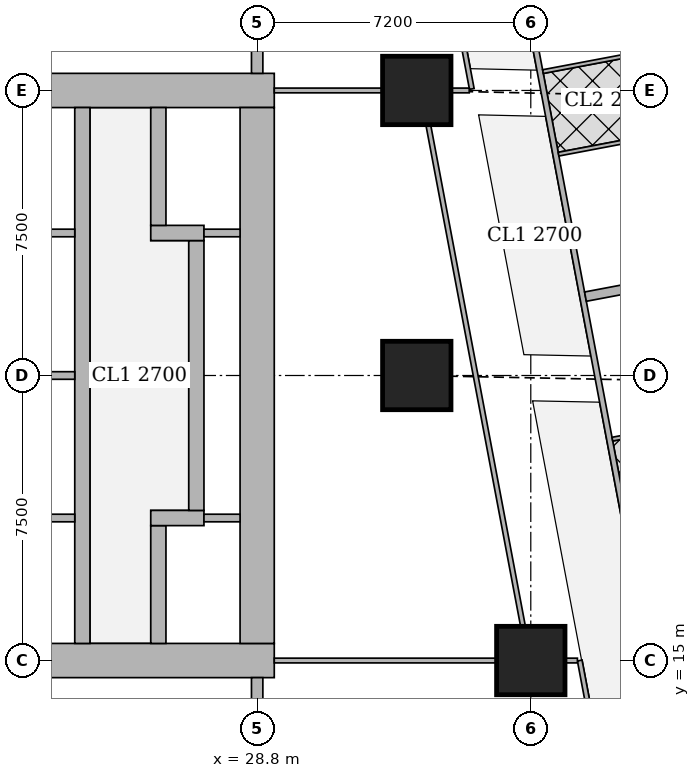
"""IFC4 building model, lengths in metres.
Left out: names, types, materials, properties, quantities, classifications, styles, units other than length and angle.
Written with IfcOpenShell. Run it as: python <this file> out.ifc"""

import sys

from ifc_helpers import new_model, si_unit, direction, frame, frame_2d, origin, origin_2d, place, context, subcontext, project, spatial, rectangle, extrude, element, fill, save


model = new_model("IFC4")
c1 = context("Model", 3, precision=1e-05, world=origin(), true_north=direction((0.0, 1.0)))
c2 = subcontext(c1, "Body", "Model", "MODEL_VIEW")
j1 = project(units=[si_unit("LENGTHUNIT", "METRE"), si_unit("PLANEANGLEUNIT", "RADIAN")], contexts=[c1])
p1 = place(None, origin())
s1 = spatial("IfcSite", under=j1, at=p1, CompositionType="ELEMENT")
p2 = place(p1, origin())
s2 = spatial("IfcBuilding", under=s1, at=p2, CompositionType="ELEMENT")
p3 = place(p2, frame((0.0, 0.0, 53.75)))
s3 = spatial("IfcBuildingStorey", under=s2, at=p3, CompositionType="ELEMENT", Elevation=53.75)
for number, where, z_axis, x_axis in (
    (1, (36.0, 15.0, 0.0), (0.0, 0.0, 1.0), (1.0, 0.0, 0.0)),
    (2, (33.0, 22.5, 0.0), (0.0, 0.0, 1.0), (1.0, 0.0, 0.0)),
    (3, (33.0, 30.0, 0.0), (0.0, 0.0, 1.0), (1.0, 0.0, 0.0)),
):
    element("IfcColumn", number, at=place(p3, frame(where, z_axis=z_axis, x_axis=x_axis)), inside=s3, PredefinedType="COLUMN", context=c2, shape_type="SweptSolid", body=[
        extrude(rectangle(XDim=1.8, YDim=1.8, at=origin_2d()), origin(), (0.0, 0.0, 1.0), 3.75),
    ])
p4 = place(p3, frame((13.95, 15.0, 0.0), z_axis=(0.0, 0.0, 1.0), x_axis=(1.0, 0.0, 0.0)))
e4 = element("IfcWall", 4, at=p4, inside=s3, PredefinedType="SHEAR", context=c2, shape_type="SweptSolid", body=[
    extrude(rectangle(XDim=15.3, YDim=0.9, at=frame_2d((7.65, 0.0))), origin(), (0.0, 0.0, 1.0), 3.75),
])
p5 = place(p4, frame((4.45, 0.0, 0.0)))
e5 = element("IfcOpeningElement", 5, at=p5, cuts=e4, PredefinedType="OPENING", context=c2, shape_type="SweptSolid", body=[
    extrude(rectangle(XDim=1.8, YDim=2.1, at=frame_2d((0.9, 1.05))), frame((0.0, 0.46, 0.0), z_axis=(0.0, -1.0, 0.0), x_axis=(1.0, 0.0, 0.0)), (0.0, 0.0, 1.0), 0.92),
])
p6 = place(p4, frame((10.7, 0.0, 0.0)))
e6 = element("IfcOpeningElement", 6, at=p6, cuts=e4, PredefinedType="OPENING", context=c2, shape_type="SweptSolid", body=[
    extrude(rectangle(XDim=1.1, YDim=2.1, at=frame_2d((0.55, 1.05))), frame((0.0, 0.46, 0.0), z_axis=(0.0, -1.0, 0.0), x_axis=(1.0, 0.0, 0.0)), (0.0, 0.0, 1.0), 0.92),
])
p7 = place(p3, frame((13.95, 30.0, 0.0), z_axis=(0.0, 0.0, 1.0), x_axis=(1.0, 0.0, 0.0)))
e7 = element("IfcWall", 7, at=p7, inside=s3, PredefinedType="SHEAR", context=c2, shape_type="SweptSolid", body=[
    extrude(rectangle(XDim=15.3, YDim=0.9, at=frame_2d((7.65, 0.0))), origin(), (0.0, 0.0, 1.0), 3.75),
])
p8 = place(p7, frame((4.45, 0.0, 0.0)))
e8 = element("IfcOpeningElement", 8, at=p8, cuts=e7, PredefinedType="OPENING", context=c2, shape_type="SweptSolid", body=[
    extrude(rectangle(XDim=1.8, YDim=2.1, at=frame_2d((0.9, 1.05))), frame((0.0, 0.46, 0.0), z_axis=(0.0, -1.0, 0.0), x_axis=(1.0, 0.0, 0.0)), (0.0, 0.0, 1.0), 0.92),
])
p9 = place(p7, frame((10.7, 0.0, 0.0)))
e9 = element("IfcOpeningElement", 9, at=p9, cuts=e7, PredefinedType="OPENING", context=c2, shape_type="SweptSolid", body=[
    extrude(rectangle(XDim=1.1, YDim=2.1, at=frame_2d((0.55, 1.05))), frame((0.0, 0.46, 0.0), z_axis=(0.0, -1.0, 0.0), x_axis=(1.0, 0.0, 0.0)), (0.0, 0.0, 1.0), 0.92),
])
p10 = place(p3, frame((28.8, 15.45, 0.0), z_axis=(0.0, 0.0, 1.0), x_axis=(0.0, 1.0, 0.0)))
e10 = element("IfcWall", 10, at=p10, inside=s3, PredefinedType="SHEAR", context=c2, shape_type="SweptSolid", body=[
    extrude(rectangle(XDim=14.1, YDim=0.9, at=frame_2d((7.05, 0.0))), origin(), (0.0, 0.0, 1.0), 3.75),
])
p11 = place(p3, frame((24.2, 15.45, 0.0), z_axis=(0.0, 0.0, 1.0), x_axis=(0.0, 1.0, 0.0)))
e11 = element("IfcWall", 11, at=p11, inside=s3, PredefinedType="SHEAR", context=c2, shape_type="SweptSolid", body=[
    extrude(rectangle(XDim=14.1, YDim=0.4, at=frame_2d((7.05, 0.0))), origin(), (0.0, 0.0, 1.0), 3.75),
])
p12 = place(p3, frame((26.2, 15.45, 0.0), z_axis=(0.0, 0.0, 1.0), x_axis=(0.0, 1.0, 0.0)))
e12 = element("IfcWall", 12, at=p12, inside=s3, PredefinedType="SHEAR", context=c2, shape_type="SweptSolid", body=[
    extrude(rectangle(XDim=3.1, YDim=0.4, at=frame_2d((1.55, 0.0))), origin(), (0.0, 0.0, 1.0), 3.75),
])
p13 = place(p12, frame((0.825, 0.0, 0.0)))
e13 = element("IfcOpeningElement", 13, at=p13, cuts=e12, PredefinedType="OPENING", context=c2, shape_type="SweptSolid", body=[
    extrude(rectangle(XDim=1.2, YDim=2.1, at=frame_2d((0.6, 1.05))), frame((0.0, 0.21, 0.0), z_axis=(0.0, -1.0, 0.0), x_axis=(1.0, 0.0, 0.0)), (0.0, 0.0, 1.0), 0.42),
])
p14 = place(p3, frame((26.0, 18.75, 0.0), z_axis=(0.0, 0.0, 1.0), x_axis=(1.0, 0.0, 0.0)))
e14 = element("IfcWall", 14, at=p14, inside=s3, PredefinedType="SHEAR", context=c2, shape_type="SweptSolid", body=[
    extrude(rectangle(XDim=1.4, YDim=0.4, at=frame_2d((0.7, 0.0))), origin(), (0.0, 0.0, 1.0), 3.75),
])
p15 = place(p3, frame((27.2, 18.95, 0.0), z_axis=(0.0, 0.0, 1.0), x_axis=(0.0, 1.0, 0.0)))
e15 = element("IfcWall", 15, at=p15, inside=s3, PredefinedType="SHEAR", context=c2, shape_type="SweptSolid", body=[
    extrude(rectangle(XDim=7.1, YDim=0.4, at=frame_2d((3.55, 0.0))), origin(), (0.0, 0.0, 1.0), 3.75),
])
p16 = place(p3, frame((26.0, 26.25, 0.0), z_axis=(0.0, 0.0, 1.0), x_axis=(1.0, 0.0, 0.0)))
e16 = element("IfcWall", 16, at=p16, inside=s3, PredefinedType="SHEAR", context=c2, shape_type="SweptSolid", body=[
    extrude(rectangle(XDim=1.4, YDim=0.4, at=frame_2d((0.7, 0.0))), origin(), (0.0, 0.0, 1.0), 3.75),
])
p17 = place(p3, frame((26.2, 26.45, 0.0), z_axis=(0.0, 0.0, 1.0), x_axis=(0.0, 1.0, 0.0)))
e17 = element("IfcWall", 17, at=p17, inside=s3, PredefinedType="SHEAR", context=c2, shape_type="SweptSolid", body=[
    extrude(rectangle(XDim=3.1, YDim=0.4, at=frame_2d((1.55, 0.0))), origin(), (0.0, 0.0, 1.0), 3.75),
])
p18 = place(p17, frame((1.075, 0.0, 0.0)))
e18 = element("IfcOpeningElement", 18, at=p18, cuts=e17, PredefinedType="OPENING", context=c2, shape_type="SweptSolid", body=[
    extrude(rectangle(XDim=1.2, YDim=2.1, at=frame_2d((0.6, 1.05))), frame((0.0, 0.21, 0.0), z_axis=(0.0, -1.0, 0.0), x_axis=(1.0, 0.0, 0.0)), (0.0, 0.0, 1.0), 0.42),
])
for number, where, z_axis, x_axis in (
    (19, (28.8, 10.35, 0.0), (0.0, 0.0, 1.0), (0.0, 1.0, 0.0)),
    (20, (28.8, 30.45, 0.0), (0.0, 0.0, 1.0), (0.0, 1.0, 0.0)),
):
    element("IfcWall", number, at=place(p3, frame(where, z_axis=z_axis, x_axis=x_axis)), inside=s3, PredefinedType="SHEAR", context=c2, shape_type="SweptSolid", body=[
        extrude(rectangle(XDim=4.2, YDim=0.3, at=frame_2d((2.1, 0.0))), origin(), (0.0, 0.0, 1.0), 3.75),
    ])
p19 = place(p3, frame((35.094, 36.585, 0.0), z_axis=(0.0, 0.0, 1.0), x_axis=(0.185588860311, -0.982627485331, 0.0)))
e21 = element("IfcWall", 21, at=p19, inside=s3, PredefinedType="SOLIDWALL", context=c2, shape_type="SweptSolid", body=[
    extrude(rectangle(XDim=34.797, YDim=0.15, at=frame_2d((17.399, 0.0))), origin(), (0.0, 0.0, 1.0), 2.5),
])
p20 = place(p19, frame((9.828, 0.0, 0.0)))
e22 = element("IfcOpeningElement", 22, at=p20, cuts=e21, PredefinedType="OPENING", context=c2, shape_type="SweptSolid", body=[
    extrude(rectangle(XDim=1.0, YDim=2.1, at=frame_2d((0.5, 1.05))), frame((0.0, 0.085, 0.0), z_axis=(0.0, -1.0, 0.0), x_axis=(1.0, 0.0, 0.0)), (0.0, 0.0, 1.0), 0.17),
])
p21 = place(p19, frame((13.645, 0.0, 0.0)))
e23 = element("IfcOpeningElement", 23, at=p21, cuts=e21, PredefinedType="OPENING", context=c2, shape_type="SweptSolid", body=[
    extrude(rectangle(XDim=1.0, YDim=2.1, at=frame_2d((0.5, 1.05))), frame((0.0, 0.085, 0.0), z_axis=(0.0, -1.0, 0.0), x_axis=(1.0, 0.0, 0.0)), (0.0, 0.0, 1.0), 0.17),
])
p22 = place(p19, frame((25.9, 0.0, 0.0)))
e24 = element("IfcOpeningElement", 24, at=p22, cuts=e21, PredefinedType="OPENING", context=c2, shape_type="SweptSolid", body=[
    extrude(rectangle(XDim=1.0, YDim=2.1, at=frame_2d((0.5, 1.05))), frame((0.0, 0.085, 0.0), z_axis=(0.0, -1.0, 0.0), x_axis=(1.0, 0.0, 0.0)), (0.0, 0.0, 1.0), 0.17),
])
p23 = place(p3, frame((37.514, 42.089, 0.0), z_axis=(0.0, 0.0, 1.0), x_axis=(0.1856087397, -0.982623730503, 0.0)))
e25 = element("IfcWall", 25, at=p23, inside=s3, PredefinedType="PARTITIONING", context=c2, shape_type="SweptSolid", body=[
    extrude(rectangle(XDim=13.33, YDim=0.1, at=frame_2d((6.665, 0.0))), origin(), (0.0, 0.0, 1.0), 2.5),
])
p24 = place(p23, frame((11.825, 0.0, 0.0)))
e26 = element("IfcOpeningElement", 26, at=p24, cuts=e25, PredefinedType="OPENING", context=c2, shape_type="SweptSolid", body=[
    extrude(rectangle(XDim=0.9, YDim=2.1, at=frame_2d((0.45, 1.05))), frame((0.0, 0.06, 0.0), z_axis=(0.0, -1.0, 0.0), x_axis=(1.0, 0.0, 0.0)), (0.0, 0.0, 1.0), 0.12),
])
p25 = place(p23, frame((8.203, 0.0, 0.0)))
e27 = element("IfcOpeningElement", 27, at=p25, cuts=e25, PredefinedType="OPENING", context=c2, shape_type="SweptSolid", body=[
    extrude(rectangle(XDim=0.9, YDim=2.1, at=frame_2d((0.45, 1.05))), frame((0.0, 0.06, 0.0), z_axis=(0.0, -1.0, 0.0), x_axis=(1.0, 0.0, 0.0)), (0.0, 0.0, 1.0), 0.12),
])
p26 = place(p23, frame((2.63, 0.0, 0.0)))
e28 = element("IfcOpeningElement", 28, at=p26, cuts=e25, PredefinedType="OPENING", context=c2, shape_type="SweptSolid", body=[
    extrude(rectangle(XDim=0.9, YDim=2.1, at=frame_2d((0.45, 1.05))), frame((0.0, 0.06, 0.0), z_axis=(0.0, -1.0, 0.0), x_axis=(1.0, 0.0, 0.0)), (0.0, 0.0, 1.0), 0.12),
])
p27 = place(p23, frame((9.916, 0.0, 0.0)))
e29 = element("IfcOpeningElement", 29, at=p27, cuts=e25, PredefinedType="OPENING", context=c2, shape_type="SweptSolid", body=[
    extrude(rectangle(XDim=0.9, YDim=2.1, at=frame_2d((0.45, 1.05))), frame((0.0, 0.06, 0.0), z_axis=(0.0, -1.0, 0.0), x_axis=(1.0, 0.0, 0.0)), (0.0, 0.0, 1.0), 0.12),
])
p28 = place(p23, frame((5.535, 0.0, 0.0)))
e30 = element("IfcOpeningElement", 30, at=p28, cuts=e25, PredefinedType="OPENING", context=c2, shape_type="SweptSolid", body=[
    extrude(rectangle(XDim=0.9, YDim=2.1, at=frame_2d((0.45, 1.05))), frame((0.0, 0.06, 0.0), z_axis=(0.0, -1.0, 0.0), x_axis=(1.0, 0.0, 0.0)), (0.0, 0.0, 1.0), 0.12),
])
p29 = place(p3, frame((39.997, 28.942, 0.0), z_axis=(0.0, 0.0, 1.0), x_axis=(-0.982569883123, -0.185893584556, 0.0)))
e31 = element("IfcWall", 31, at=p29, inside=s3, PredefinedType="PARTITIONING", context=c2, shape_type="SweptSolid", body=[
    extrude(rectangle(XDim=3.324, YDim=0.1, at=frame_2d((1.662, 0.0))), origin(), (0.0, 0.0, 1.0), 3.5),
])
p30 = place(p3, frame((39.538, 31.104, 0.0), z_axis=(0.0, 0.0, 1.0), x_axis=(-0.982620626894, -0.185625169636, 0.0)))
e32 = element("IfcWall", 32, at=p30, inside=s3, PredefinedType="PARTITIONING", context=c2, shape_type="SweptSolid", body=[
    extrude(rectangle(XDim=3.275, YDim=0.1, at=frame_2d((1.637, 0.0))), origin(), (0.0, 0.0, 1.0), 2.5),
])
p31 = place(p3, frame((41.365, 21.433, 0.0), z_axis=(0.0, 0.0, 1.0), x_axis=(-0.982607026909, -0.185697147715, 0.0)))
e33 = element("IfcWall", 33, at=p31, inside=s3, PredefinedType="PARTITIONING", context=c2, shape_type="SweptSolid", body=[
    extrude(rectangle(XDim=3.275, YDim=0.1, at=frame_2d((1.637, 0.0))), origin(), (0.0, 0.0, 1.0), 3.5),
])
p32 = place(p3, frame((41.885, 25.415, 0.0), z_axis=(0.0, 0.0, 1.0), x_axis=(-0.982612837616, -0.185666398014, 0.0)))
e34 = element("IfcWall", 34, at=p32, inside=s3, PredefinedType="SOLIDWALL", context=c2, shape_type="SweptSolid", body=[
    extrude(rectangle(XDim=4.525, YDim=0.25, at=frame_2d((2.262, 0.0))), origin(), (0.0, 0.0, 1.0), 3.5),
])
p33 = place(p3, frame((38.202, 10.163, 0.0), z_axis=(0.0, 0.0, 1.0), x_axis=(-0.185641892853, 0.982617467593, 0.0)))
e35 = element("IfcWall", 35, at=p33, inside=s3, PredefinedType="PARTITIONING", context=c2, shape_type="SweptSolid", body=[
    extrude(rectangle(XDim=4.922, YDim=0.125, at=frame_2d((2.461, 0.0))), origin(), (0.0, 0.0, 1.0), 3.5),
])
p34 = place(p33, frame((0.708, 0.0, 0.0)))
e36 = element("IfcOpeningElement", 36, at=p34, cuts=e35, PredefinedType="OPENING", context=c2, shape_type="SweptSolid", body=[
    extrude(rectangle(XDim=1.0, YDim=2.1, at=frame_2d((0.5, 1.05))), frame((0.0, 0.073, 0.0), z_axis=(0.0, -1.0, 0.0), x_axis=(1.0, 0.0, 0.0)), (0.0, 0.0, 1.0), 0.145),
])
p35 = place(p3, frame((34.448, 30.04, 0.0), z_axis=(0.0, 0.0, 1.0), x_axis=(-0.185749459238, 0.982597139418, 0.0)))
e37 = element("IfcWall", 37, at=p35, inside=s3, PredefinedType="PARTITIONING", context=c2, shape_type="SweptSolid", body=[
    extrude(rectangle(XDim=4.883, YDim=0.125, at=frame_2d((2.441, 0.0))), origin(), (0.0, 0.0, 1.0), 2.5),
])
p36 = place(p35, frame((1.15, 0.0, 0.0)))
e38 = element("IfcOpeningElement", 38, at=p36, cuts=e37, PredefinedType="OPENING", context=c2, shape_type="SweptSolid", body=[
    extrude(rectangle(XDim=1.0, YDim=2.1, at=frame_2d((0.5, 1.05))), frame((0.0, 0.073, 0.0), z_axis=(0.0, -1.0, 0.0), x_axis=(1.0, 0.0, 0.0)), (0.0, 0.0, 1.0), 0.145),
])
p37 = place(p35, frame((3.225, 0.0, 0.0)))
e39 = element("IfcOpeningElement", 39, at=p37, cuts=e37, PredefinedType="OPENING", context=c2, shape_type="SweptSolid", body=[
    extrude(rectangle(XDim=1.0, YDim=2.1, at=frame_2d((0.5, 1.05))), frame((0.0, 0.073, 0.0), z_axis=(0.0, -1.0, 0.0), x_axis=(1.0, 0.0, 0.0)), (0.0, 0.0, 1.0), 0.145),
])
p38 = place(p3, frame((35.793, 15.913, 0.0), z_axis=(0.0, 0.0, 1.0), x_axis=(-0.185651708232, 0.982615613162, 0.0)))
e40 = element("IfcWall", 40, at=p38, inside=s3, PredefinedType="PARTITIONING", context=c2, shape_type="SweptSolid", body=[
    extrude(rectangle(XDim=13.407, YDim=0.125, at=frame_2d((6.704, 0.0))), origin(), (0.0, 0.0, 1.0), 2.5),
])
p39 = place(p38, frame((4.9, 0.0, 0.0)))
e41 = element("IfcOpeningElement", 41, at=p39, cuts=e40, PredefinedType="OPENING", context=c2, shape_type="SweptSolid", body=[
    extrude(rectangle(XDim=1.0, YDim=2.1, at=frame_2d((0.5, 1.05))), frame((0.0, 0.073, 0.0), z_axis=(0.0, -1.0, 0.0), x_axis=(1.0, 0.0, 0.0)), (0.0, 0.0, 1.0), 0.145),
])
p40 = place(p3, frame((29.25, 15.0, 0.0), z_axis=(0.0, 0.0, 1.0), x_axis=(1.0, 0.0, 0.0)))
e42 = element("IfcWall", 42, at=p40, inside=s3, PredefinedType="PARTITIONING", context=c2, shape_type="SweptSolid", body=[
    extrude(rectangle(XDim=5.849, YDim=0.125, at=frame_2d((2.925, 0.0))), origin(), (0.0, 0.0, 1.0), 3.5),
])
p41 = place(p3, frame((36.901, 15.0, 0.0), z_axis=(0.0, 0.0, 1.0), x_axis=(1.0, 0.0, 0.0)))
e43 = element("IfcWall", 43, at=p41, inside=s3, PredefinedType="PARTITIONING", context=c2, shape_type="SweptSolid", body=[
    extrude(rectangle(XDim=0.326, YDim=0.125, at=frame_2d((0.163, 0.0))), origin(), (0.0, 0.0, 1.0), 3.5),
])
p42 = place(p3, frame((29.25, 30.0, 0.0), z_axis=(0.0, 0.0, 1.0), x_axis=(1.0, 0.0, 0.0)))
e44 = element("IfcWall", 44, at=p42, inside=s3, PredefinedType="PARTITIONING", context=c2, shape_type="SweptSolid", body=[
    extrude(rectangle(XDim=2.849, YDim=0.125, at=frame_2d((1.425, 0.0))), origin(), (0.0, 0.0, 1.0), 3.5),
])
p43 = place(p3, frame((33.901, 30.0, 0.0), z_axis=(0.0, 0.0, 1.0), x_axis=(1.0, 0.0, 0.0)))
e45 = element("IfcWall", 45, at=p43, inside=s3, PredefinedType="PARTITIONING", context=c2, shape_type="SweptSolid", body=[
    extrude(rectangle(XDim=0.479, YDim=0.125, at=frame_2d((0.24, 0.0))), origin(), (0.0, 0.0, 1.0), 2.5),
])
for number, where, z_axis, x_axis in (
    (46, (21.8, 18.75, 0.0), (0.0, 0.0, 1.0), (1.0, 0.0, 0.0)),
    (47, (21.8, 22.5, 0.0), (0.0, 0.0, 1.0), (1.0, 0.0, 0.0)),
    (48, (21.8, 26.25, 0.0), (0.0, 0.0, 1.0), (1.0, 0.0, 0.0)),
):
    element("IfcWall", number, at=place(p3, frame(where, z_axis=z_axis, x_axis=x_axis)), inside=s3, PredefinedType="SOLIDWALL", context=c2, shape_type="SweptSolid", body=[
        extrude(rectangle(XDim=2.2, YDim=0.2, at=frame_2d((1.1, 0.0))), origin(), (0.0, 0.0, 1.0), 3.5),
    ])
for number, where, z_axis, x_axis in (
    (49, (27.4, 18.75, 0.0), (0.0, 0.0, 1.0), (1.0, 0.0, 0.0)),
    (50, (27.4, 26.25, 0.0), (0.0, 0.0, 1.0), (1.0, 0.0, 0.0)),
):
    element("IfcWall", number, at=place(p3, frame(where, z_axis=z_axis, x_axis=x_axis)), inside=s3, PredefinedType="SOLIDWALL", context=c2, shape_type="SweptSolid", body=[
        extrude(rectangle(XDim=0.95, YDim=0.2, at=frame_2d((0.475, 0.0))), origin(), (0.0, 0.0, 1.0), 3.5),
    ])
p44 = place(p20, origin())
e51 = element("IfcDoor", 51, at=p44, inside=s3, OperationType="SINGLE_SWING_LEFT", PredefinedType="DOOR", context=c2, shape_type="SweptSolid", body=[
    extrude(rectangle(XDim=1.0, YDim=2.1, at=frame_2d((0.5, 1.05))), frame((0.0, 0.025, 0.0), z_axis=(0.0, -1.0, 0.0), x_axis=(1.0, 0.0, 0.0)), (0.0, 0.0, 1.0), 0.05),
])
fill(e22, e51)
p45 = place(p21, origin())
e52 = element("IfcDoor", 52, at=p45, inside=s3, OperationType="SINGLE_SWING_LEFT", PredefinedType="DOOR", context=c2, shape_type="SweptSolid", body=[
    extrude(rectangle(XDim=1.0, YDim=2.1, at=frame_2d((0.5, 1.05))), frame((0.0, 0.025, 0.0), z_axis=(0.0, -1.0, 0.0), x_axis=(1.0, 0.0, 0.0)), (0.0, 0.0, 1.0), 0.05),
])
fill(e23, e52)
p46 = place(p39, origin())
e53 = element("IfcDoor", 53, at=p46, inside=s3, OperationType="SINGLE_SWING_LEFT", PredefinedType="DOOR", context=c2, shape_type="SweptSolid", body=[
    extrude(rectangle(XDim=1.0, YDim=2.1, at=frame_2d((0.5, 1.05))), frame((0.0, 0.025, 0.0), z_axis=(0.0, -1.0, 0.0), x_axis=(1.0, 0.0, 0.0)), (0.0, 0.0, 1.0), 0.05),
])
fill(e41, e53)
p47 = place(p6, origin())
e54 = element("IfcDoor", 54, at=p47, inside=s3, OperationType="SINGLE_SWING_LEFT", PredefinedType="DOOR", context=c2, shape_type="SweptSolid", body=[
    extrude(rectangle(XDim=1.1, YDim=2.1, at=frame_2d((0.55, 1.05))), frame((0.0, 0.025, 0.0), z_axis=(0.0, -1.0, 0.0), x_axis=(1.0, 0.0, 0.0)), (0.0, 0.0, 1.0), 0.05),
])
fill(e6, e54)
p48 = place(p9, origin())
e55 = element("IfcDoor", 55, at=p48, inside=s3, OperationType="SINGLE_SWING_LEFT", PredefinedType="DOOR", context=c2, shape_type="SweptSolid", body=[
    extrude(rectangle(XDim=1.1, YDim=2.1, at=frame_2d((0.55, 1.05))), frame((0.0, 0.025, 0.0), z_axis=(0.0, -1.0, 0.0), x_axis=(1.0, 0.0, 0.0)), (0.0, 0.0, 1.0), 0.05),
])
fill(e9, e55)
p49 = place(p13, origin())
e56 = element("IfcDoor", 56, at=p49, inside=s3, OperationType="DOUBLE_DOOR_SLIDING", PredefinedType="DOOR", context=c2, shape_type="SweptSolid", body=[
    extrude(rectangle(XDim=1.2, YDim=2.1, at=frame_2d((0.6, 1.05))), frame((0.0, 0.025, 0.0), z_axis=(0.0, -1.0, 0.0), x_axis=(1.0, 0.0, 0.0)), (0.0, 0.0, 1.0), 0.05),
])
fill(e13, e56)
p50 = place(p18, origin())
e57 = element("IfcDoor", 57, at=p50, inside=s3, OperationType="DOUBLE_DOOR_SLIDING", PredefinedType="DOOR", context=c2, shape_type="SweptSolid", body=[
    extrude(rectangle(XDim=1.2, YDim=2.1, at=frame_2d((0.6, 1.05))), frame((0.0, 0.025, 0.0), z_axis=(0.0, -1.0, 0.0), x_axis=(1.0, 0.0, 0.0)), (0.0, 0.0, 1.0), 0.05),
])
fill(e18, e57)
save(model, sys.argv[1])
